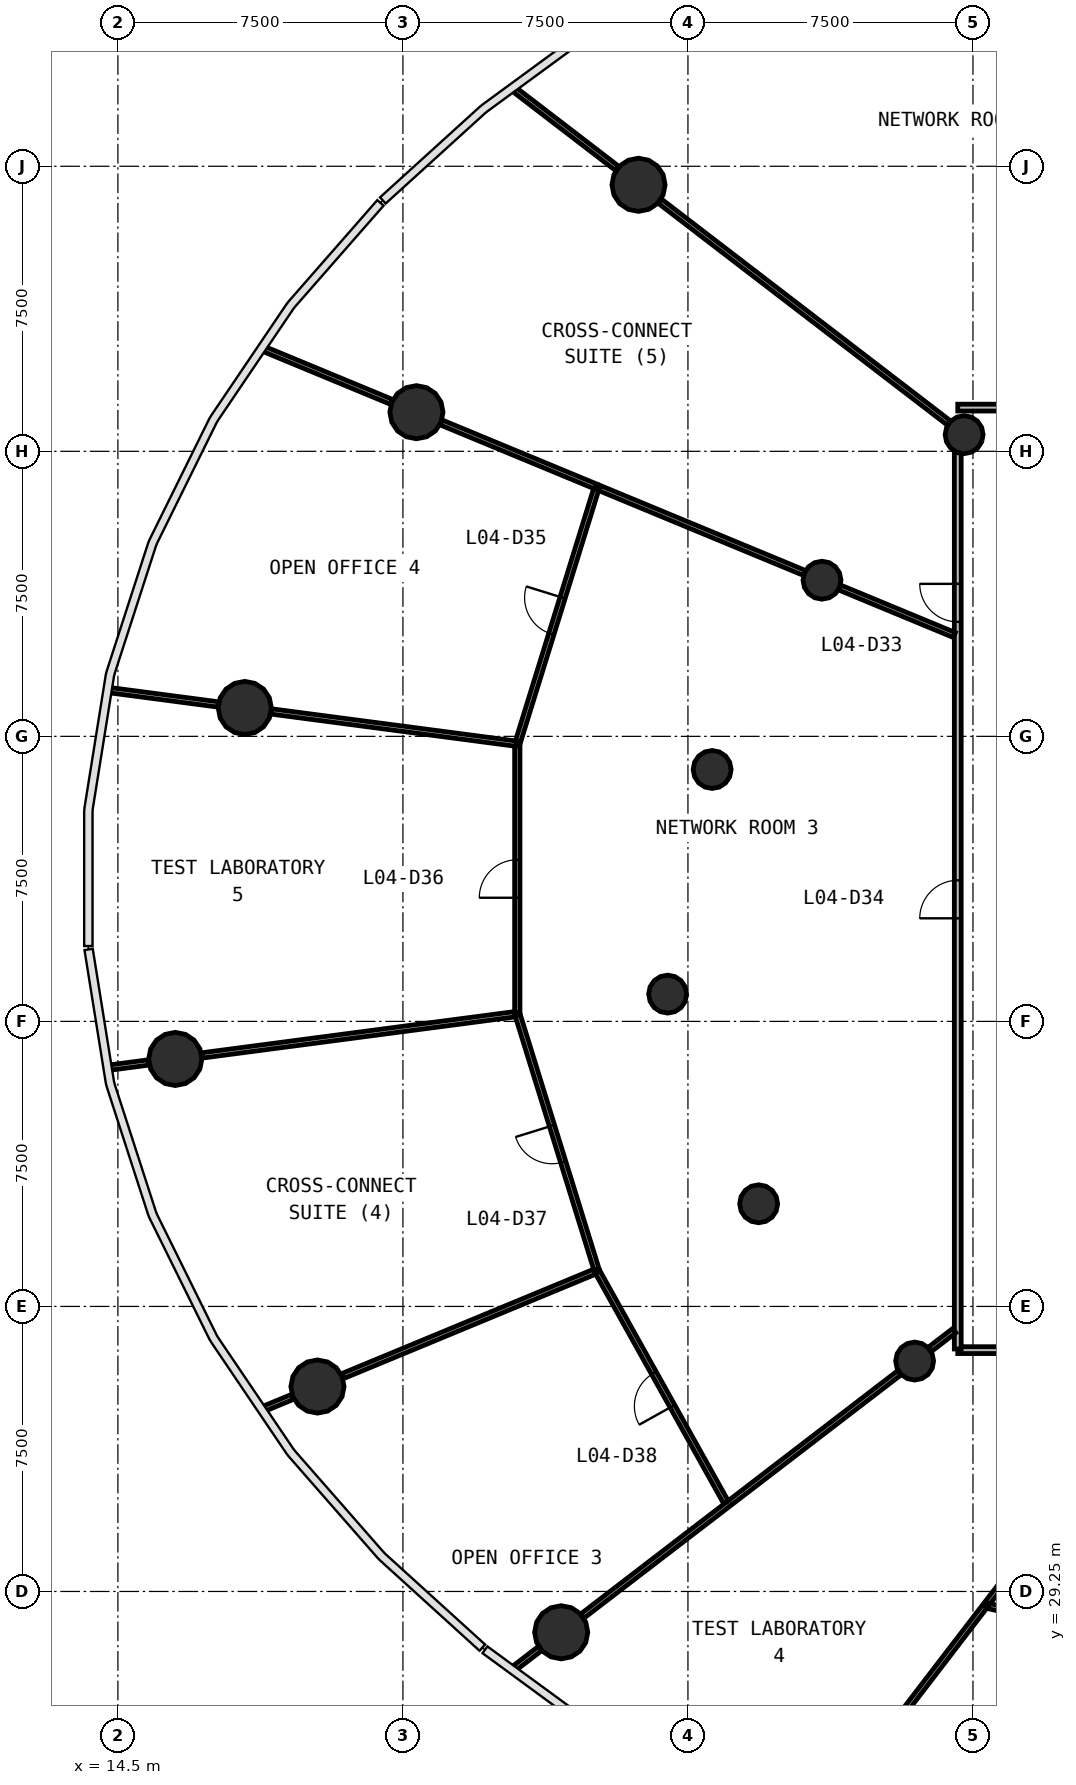
"""IFC4 building model, lengths in metres.
Left out: names, types, materials, properties, quantities, classifications, styles, units other than length and angle.
Written with IfcOpenShell. Run it as: python <this file> out.ifc"""

import sys

from ifc_helpers import new_model, si_unit, direction, frame, frame_2d, origin, origin_2d, place, context, subcontext, project, spatial, rectangle, circle, extrude, source, transform, mapped, element, fill, save


model = new_model("IFC4")
c1 = context("Model", 3, precision=1e-05, world=origin(), true_north=direction((0.0, 1.0)))
c2 = subcontext(c1, "Body", "Model", "MODEL_VIEW")
j1 = project(units=[si_unit("LENGTHUNIT", "METRE"), si_unit("PLANEANGLEUNIT", "RADIAN")], contexts=[c1])
p1 = place(None, origin())
s1 = spatial("IfcSite", under=j1, at=p1, CompositionType="ELEMENT")
p2 = place(p1, origin())
s2 = spatial("IfcBuilding", under=s1, at=p2, CompositionType="ELEMENT")
p3 = place(p2, frame((0.0, 0.0, 18.2)))
s3 = spatial("IfcBuildingStorey", under=s2, at=p3, CompositionType="ELEMENT", Elevation=18.2)
m1 = source(origin(), c2, "Body", "SweptSolid", [
    extrude(circle(Radius=0.7, at=origin_2d()), origin(), (0.0, 0.0, 1.0), 4.4),
])
for number, where, z_axis, x_axis in (
    (1, (28.199, 66.263, 0.0), (0.0, 0.0, 1.0), (1.0, 0.0, 0.0)),
    (2, (22.355, 60.279, 0.0), (0.0, 0.0, 1.0), (1.0, 0.0, 0.0)),
    (3, (17.839, 52.497, 0.0), (0.0, 0.0, 1.0), (1.0, 0.0, 0.0)),
    (4, (16.01, 43.262, 0.0), (0.0, 0.0, 1.0), (1.0, 0.0, 0.0)),
    (5, (19.751, 34.642, 0.0), (0.0, 0.0, 1.0), (1.0, 0.0, 0.0)),
    (6, (26.164, 28.176, 0.0), (0.0, 0.0, 1.0), (1.0, 0.0, 0.0)),
):
    element("IfcColumn", number, at=place(p3, frame(where, z_axis=z_axis, x_axis=x_axis)), inside=s3, PredefinedType="COLUMN", context=c2, shape_type="MappedRepresentation", body=[
        mapped(m1, transform((0.0, 0.0, 0.0), scale=1.0)),
    ])
m2 = source(origin(), c2, "Body", "SweptSolid", [
    extrude(circle(Radius=0.5, at=origin_2d()), origin(), (0.0, 0.0, 1.0), 4.4),
])
for number, where, z_axis, x_axis in (
    (7, (36.768, 59.688, 0.0), (0.0, 0.0, 1.0), (1.0, 0.0, 0.0)),
    (8, (33.028, 55.859, 0.0), (0.0, 0.0, 1.0), (1.0, 0.0, 0.0)),
    (9, (30.137, 50.878, 0.0), (0.0, 0.0, 1.0), (1.0, 0.0, 0.0)),
    (10, (28.966, 44.968, 0.0), (0.0, 0.0, 1.0), (1.0, 0.0, 0.0)),
    (11, (31.361, 39.451, 0.0), (0.0, 0.0, 1.0), (1.0, 0.0, 0.0)),
    (12, (35.465, 35.312, 0.0), (0.0, 0.0, 1.0), (1.0, 0.0, 0.0)),
):
    element("IfcColumn", number, at=place(p3, frame(where, z_axis=z_axis, x_axis=x_axis)), inside=s3, PredefinedType="COLUMN", context=c2, shape_type="MappedRepresentation", body=[
        mapped(m2, transform((0.0, 0.0, 0.0), scale=1.0)),
    ])
p4 = place(p3, frame((67.4, 35.6, 0.0), z_axis=(0.0, 0.0, 1.0), x_axis=(-1.0, 0.0, 0.0)))
e13 = element("IfcWall", 13, at=p4, inside=s3, PredefinedType="PARTITIONING", context=c2, shape_type="SweptSolid", body=[
    extrude(rectangle(XDim=30.8, YDim=0.18, at=frame_2d((15.4, 0.0))), origin(), (0.0, 0.0, 1.0), 3.15),
])
p5 = place(p4, frame((25.55, 0.0, 0.0)))
e14 = element("IfcOpeningElement", 14, at=p5, cuts=e13, PredefinedType="OPENING", context=c2, shape_type="SweptSolid", body=[
    extrude(rectangle(XDim=1.0, YDim=2.1, at=frame_2d((0.5, 1.05))), frame((0.0, 0.1, 0.0), z_axis=(0.0, -1.0, 0.0), x_axis=(1.0, 0.0, 0.0)), (0.0, 0.0, 1.0), 0.2),
])
p6 = place(p4, frame((14.95, 0.0, 0.0)))
e15 = element("IfcOpeningElement", 15, at=p6, cuts=e13, PredefinedType="OPENING", context=c2, shape_type="SweptSolid", body=[
    extrude(rectangle(XDim=1.0, YDim=2.1, at=frame_2d((0.5, 1.05))), frame((0.0, 0.1, 0.0), z_axis=(0.0, -1.0, 0.0), x_axis=(1.0, 0.0, 0.0)), (0.0, 0.0, 1.0), 0.2),
])
p7 = place(p4, frame((8.95, 0.0, 0.0)))
e16 = element("IfcOpeningElement", 16, at=p7, cuts=e13, PredefinedType="OPENING", context=c2, shape_type="SweptSolid", body=[
    extrude(rectangle(XDim=1.0, YDim=2.1, at=frame_2d((0.5, 1.05))), frame((0.0, 0.1, 0.0), z_axis=(0.0, -1.0, 0.0), x_axis=(1.0, 0.0, 0.0)), (0.0, 0.0, 1.0), 0.2),
])
p8 = place(p3, frame((36.6, 60.4, 0.0), z_axis=(0.0, 0.0, 1.0), x_axis=(1.0, 0.0, 0.0)))
e17 = element("IfcWall", 17, at=p8, inside=s3, PredefinedType="PARTITIONING", context=c2, shape_type="SweptSolid", body=[
    extrude(rectangle(XDim=30.8, YDim=0.18, at=frame_2d((15.4, 0.0))), origin(), (0.0, 0.0, 1.0), 3.15),
])
p9 = place(p8, frame((17.35, 0.0, 0.0)))
e18 = element("IfcOpeningElement", 18, at=p9, cuts=e17, PredefinedType="OPENING", context=c2, shape_type="SweptSolid", body=[
    extrude(rectangle(XDim=1.0, YDim=2.1, at=frame_2d((0.5, 1.05))), frame((0.0, 0.1, 0.0), z_axis=(0.0, -1.0, 0.0), x_axis=(1.0, 0.0, 0.0)), (0.0, 0.0, 1.0), 0.2),
])
p10 = place(p8, frame((14.85, 0.0, 0.0)))
e19 = element("IfcOpeningElement", 19, at=p10, cuts=e17, PredefinedType="OPENING", context=c2, shape_type="SweptSolid", body=[
    extrude(rectangle(XDim=0.9, YDim=2.1, at=frame_2d((0.45, 1.05))), frame((0.0, 0.1, 0.0), z_axis=(0.0, -1.0, 0.0), x_axis=(1.0, 0.0, 0.0)), (0.0, 0.0, 1.0), 0.2),
])
p11 = place(p8, frame((12.65, 0.0, 0.0)))
e20 = element("IfcOpeningElement", 20, at=p11, cuts=e17, PredefinedType="OPENING", context=c2, shape_type="SweptSolid", body=[
    extrude(rectangle(XDim=0.9, YDim=2.1, at=frame_2d((0.45, 1.05))), frame((0.0, 0.1, 0.0), z_axis=(0.0, -1.0, 0.0), x_axis=(1.0, 0.0, 0.0)), (0.0, 0.0, 1.0), 0.2),
])
p12 = place(p8, frame((8.95, 0.0, 0.0)))
e21 = element("IfcOpeningElement", 21, at=p12, cuts=e17, PredefinedType="OPENING", context=c2, shape_type="SweptSolid", body=[
    extrude(rectangle(XDim=1.0, YDim=2.1, at=frame_2d((0.5, 1.05))), frame((0.0, 0.1, 0.0), z_axis=(0.0, -1.0, 0.0), x_axis=(1.0, 0.0, 0.0)), (0.0, 0.0, 1.0), 0.2),
])
p13 = place(p3, frame((36.6, 35.63, 0.0), z_axis=(0.0, 0.0, 1.0), x_axis=(0.0, 1.0, 0.0)))
e22 = element("IfcWall", 22, at=p13, inside=s3, PredefinedType="PARTITIONING", context=c2, shape_type="SweptSolid", body=[
    extrude(rectangle(XDim=23.583, YDim=0.18, at=frame_2d((11.791, 0.0))), origin(), (0.0, 0.0, 1.0), 3.15),
])
p14 = place(p13, frame((19.133, 0.0, 0.0)))
e23 = element("IfcOpeningElement", 23, at=p14, cuts=e22, PredefinedType="OPENING", context=c2, shape_type="SweptSolid", body=[
    extrude(rectangle(XDim=1.0, YDim=2.1, at=frame_2d((0.5, 1.05))), frame((0.0, 0.1, 0.0), z_axis=(0.0, -1.0, 0.0), x_axis=(1.0, 0.0, 0.0)), (0.0, 0.0, 1.0), 0.2),
])
p15 = place(p13, frame((11.333, 0.0, 0.0)))
e24 = element("IfcOpeningElement", 24, at=p15, cuts=e22, PredefinedType="OPENING", context=c2, shape_type="SweptSolid", body=[
    extrude(rectangle(XDim=1.0, YDim=2.1, at=frame_2d((0.5, 1.05))), frame((0.0, 0.1, 0.0), z_axis=(0.0, -1.0, 0.0), x_axis=(1.0, 0.0, 0.0)), (0.0, 0.0, 1.0), 0.2),
])
p16 = place(p3, frame((26.723, 28.604, 0.0), z_axis=(0.0, 0.0, 1.0), x_axis=(0.793353660174, 0.608761012129, 0.0)))
e25 = element("IfcWall", 25, at=p16, inside=s3, PredefinedType="PARTITIONING", context=c2, shape_type="SweptSolid", body=[
    extrude(rectangle(XDim=10.515, YDim=0.14, at=frame_2d((5.257, 0.0))), origin(), (0.0, 0.0, 1.0), 3.15),
])
p17 = place(p3, frame((36.367, 59.995, 0.0), z_axis=(0.0, 0.0, 1.0), x_axis=(-0.793366218398, 0.608744645566, 0.0)))
e26 = element("IfcWall", 26, at=p17, inside=s3, PredefinedType="PARTITIONING", context=c2, shape_type="SweptSolid", body=[
    extrude(rectangle(XDim=9.591, YDim=0.14, at=frame_2d((4.796, 0.0))), origin(), (0.0, 0.0, 1.0), 3.15),
])
p18 = place(p3, frame((25.01, 44.447, 0.0), z_axis=(0.0, 0.0, 1.0), x_axis=(-0.991444269677, -0.130530686527, 0.0)))
e27 = element("IfcWall", 27, at=p18, inside=s3, PredefinedType="PARTITIONING", context=c2, shape_type="SweptSolid", body=[
    extrude(rectangle(XDim=8.374, YDim=0.14, at=frame_2d((4.187, 0.0))), origin(), (0.0, 0.0, 1.0), 3.15),
])
p19 = place(p3, frame((27.104, 37.688, 0.0), z_axis=(0.0, 0.0, 1.0), x_axis=(-0.923879422024, -0.382683699105, 0.0)))
e28 = element("IfcWall", 28, at=p19, inside=s3, PredefinedType="PARTITIONING", context=c2, shape_type="SweptSolid", body=[
    extrude(rectangle(XDim=7.254, YDim=0.14, at=frame_2d((3.627, 0.0))), origin(), (0.0, 0.0, 1.0), 3.15),
])
p20 = place(p3, frame((25.01, 44.477, 0.0), z_axis=(0.0, 0.0, 1.0), x_axis=(0.0, 1.0, 0.0)))
e29 = element("IfcWall", 29, at=p20, inside=s3, PredefinedType="PARTITIONING", context=c2, shape_type="SweptSolid", body=[
    extrude(rectangle(XDim=7.077, YDim=0.14, at=frame_2d((3.538, 0.0))), origin(), (0.0, 0.0, 1.0), 3.15),
])
p21 = place(p20, frame((3.027, 0.0, 0.0)))
e30 = element("IfcOpeningElement", 30, at=p21, cuts=e29, PredefinedType="OPENING", context=c2, shape_type="SweptSolid", body=[
    extrude(rectangle(XDim=1.0, YDim=2.1, at=frame_2d((0.5, 1.05))), frame((0.0, 0.08, 0.0), z_axis=(0.0, -1.0, 0.0), x_axis=(1.0, 0.0, 0.0)), (0.0, 0.0, 1.0), 0.16),
])
p22 = place(p3, frame((25.019, 51.582, 0.0), z_axis=(0.0, 0.0, 1.0), x_axis=(0.296052616662, 0.955171632832, 0.0)))
e31 = element("IfcWall", 31, at=p22, inside=s3, PredefinedType="PARTITIONING", context=c2, shape_type="SweptSolid", body=[
    extrude(rectangle(XDim=7.046, YDim=0.14, at=frame_2d((3.523, 0.0))), origin(), (0.0, 0.0, 1.0), 3.15),
])
p23 = place(p22, frame((2.996, 0.0, 0.0)))
e32 = element("IfcOpeningElement", 32, at=p23, cuts=e31, PredefinedType="OPENING", context=c2, shape_type="SweptSolid", body=[
    extrude(rectangle(XDim=1.0, YDim=2.1, at=frame_2d((0.5, 1.05))), frame((0.0, 0.08, 0.0), z_axis=(0.0, -1.0, 0.0), x_axis=(1.0, 0.0, 0.0)), (0.0, 0.0, 1.0), 0.16),
])
p24 = place(p3, frame((27.095, 37.717, 0.0), z_axis=(0.0, 0.0, 1.0), x_axis=(-0.296029243549, 0.955178876946, 0.0)))
e33 = element("IfcWall", 33, at=p24, inside=s3, PredefinedType="PARTITIONING", context=c2, shape_type="SweptSolid", body=[
    extrude(rectangle(XDim=7.016, YDim=0.14, at=frame_2d((3.508, 0.0))), origin(), (0.0, 0.0, 1.0), 3.15),
])
p25 = place(p24, frame((2.966, 0.0, 0.0)))
e34 = element("IfcOpeningElement", 34, at=p25, cuts=e33, PredefinedType="OPENING", context=c2, shape_type="SweptSolid", body=[
    extrude(rectangle(XDim=1.0, YDim=2.1, at=frame_2d((0.5, 1.05))), frame((0.0, 0.08, 0.0), z_axis=(0.0, -1.0, 0.0), x_axis=(1.0, 0.0, 0.0)), (0.0, 0.0, 1.0), 0.16),
])
p26 = place(p3, frame((30.502, 31.593, 0.0), z_axis=(0.0, 0.0, 1.0), x_axis=(-0.486916265404, 0.873448653606, 0.0)))
e35 = element("IfcWall", 35, at=p26, inside=s3, PredefinedType="PARTITIONING", context=c2, shape_type="SweptSolid", body=[
    extrude(rectangle(XDim=6.948, YDim=0.14, at=frame_2d((3.474, 0.0))), origin(), (0.0, 0.0, 1.0), 3.15),
])
p27 = place(p26, frame((2.899, 0.0, 0.0)))
e36 = element("IfcOpeningElement", 36, at=p27, cuts=e35, PredefinedType="OPENING", context=c2, shape_type="SweptSolid", body=[
    extrude(rectangle(XDim=1.0, YDim=2.1, at=frame_2d((0.5, 1.05))), frame((0.0, 0.08, 0.0), z_axis=(0.0, -1.0, 0.0), x_axis=(1.0, 0.0, 0.0)), (0.0, 0.0, 1.0), 0.16),
])
p28 = place(p3, frame((24.98, 51.557, 0.0), z_axis=(0.0, 0.0, 1.0), x_axis=(-0.9914463656, 0.130514765976, 0.0)))
e37 = element("IfcWall", 37, at=p28, inside=s3, PredefinedType="PARTITIONING", context=c2, shape_type="SweptSolid", body=[
    extrude(rectangle(XDim=6.499, YDim=0.14, at=frame_2d((3.249, 0.0))), origin(), (0.0, 0.0, 1.0), 3.15),
])
p29 = place(p3, frame((43.503, 27.486, 0.0), z_axis=(0.0, 0.0, 1.0), x_axis=(-0.975258543616, 0.221067349702, 0.0)))
e38 = element("IfcWall", 38, at=p29, inside=s3, PredefinedType="PARTITIONING", context=c2, shape_type="SweptSolid", body=[
    extrude(rectangle(XDim=6.327, YDim=0.14, at=frame_2d((3.164, 0.0))), origin(), (0.0, 0.0, 1.0), 3.15),
])
p30 = place(p29, frame((2.677, 0.0, 0.0)))
e39 = element("IfcOpeningElement", 39, at=p30, cuts=e38, PredefinedType="OPENING", context=c2, shape_type="SweptSolid", body=[
    extrude(rectangle(XDim=1.0, YDim=2.1, at=frame_2d((0.5, 1.05))), frame((0.0, 0.08, 0.0), z_axis=(0.0, -1.0, 0.0), x_axis=(1.0, 0.0, 0.0)), (0.0, 0.0, 1.0), 0.16),
])
p31 = place(p3, frame((32.561, 56.052, 0.0), z_axis=(0.0, 0.0, 1.0), x_axis=(-0.923886814097, 0.382665852588, 0.0)))
e40 = element("IfcWall", 40, at=p31, inside=s3, PredefinedType="PARTITIONING", context=c2, shape_type="SweptSolid", body=[
    extrude(rectangle(XDim=5.836, YDim=0.14, at=frame_2d((2.918, 0.0))), origin(), (0.0, 0.0, 1.0), 3.15),
])
p32 = place(p3, frame((37.314, 28.861, 0.0), z_axis=(0.0, 0.0, 1.0), x_axis=(-0.608764043611, -0.79335133403, 0.0)))
e41 = element("IfcWall", 41, at=p32, inside=s3, PredefinedType="PARTITIONING", context=c2, shape_type="SweptSolid", body=[
    extrude(rectangle(XDim=5.548, YDim=0.14, at=frame_2d((2.774, 0.0))), origin(), (0.0, 0.0, 1.0), 3.15),
])
p33 = place(p3, frame((27.077, 58.323, 0.0), z_axis=(0.0, 0.0, 1.0), x_axis=(-0.923858763081, 0.382733570356, 0.0)))
e42 = element("IfcWall", 42, at=p33, inside=s3, PredefinedType="PARTITIONING", context=c2, shape_type="SweptSolid", body=[
    extrude(rectangle(XDim=4.405, YDim=0.14, at=frame_2d((2.203, 0.0))), origin(), (0.0, 0.0, 1.0), 3.15),
])
p34 = place(p3, frame((39.858, 32.176, 0.0), z_axis=(0.0, 0.0, 1.0), x_axis=(-0.608780171248, -0.793338958513, 0.0)))
e43 = element("IfcWall", 43, at=p34, inside=s3, PredefinedType="PARTITIONING", context=c2, shape_type="SweptSolid", body=[
    extrude(rectangle(XDim=4.072, YDim=0.14, at=frame_2d((2.036, 0.0))), origin(), (0.0, 0.0, 1.0), 3.15),
])
p35 = place(p3, frame((21.704, 60.549, 0.0), z_axis=(0.0, 0.0, 1.0), x_axis=(-0.923882033439, 0.382677394537, 0.0)))
e44 = element("IfcWall", 44, at=p35, inside=s3, PredefinedType="PARTITIONING", context=c2, shape_type="SweptSolid", body=[
    extrude(rectangle(XDim=3.642, YDim=0.14, at=frame_2d((1.821, 0.0))), origin(), (0.0, 0.0, 1.0), 3.15),
])
p36 = place(p3, frame((27.641, 66.691, 0.0), z_axis=(0.0, 0.0, 1.0), x_axis=(-0.793324630829, 0.608798842082, 0.0)))
e45 = element("IfcWall", 45, at=p36, inside=s3, PredefinedType="PARTITIONING", context=c2, shape_type="SweptSolid", body=[
    extrude(rectangle(XDim=3.404, YDim=0.14, at=frame_2d((1.702, 0.0))), origin(), (0.0, 0.0, 1.0), 3.15),
])
p37 = place(p3, frame((36.51, 54.416, 0.0), z_axis=(0.0, 0.0, 1.0), x_axis=(-0.923911109142, 0.382607190737, 0.0)))
e46 = element("IfcWall", 46, at=p37, inside=s3, PredefinedType="PARTITIONING", context=c2, shape_type="SweptSolid", body=[
    extrude(rectangle(XDim=3.264, YDim=0.14, at=frame_2d((1.632, 0.0))), origin(), (0.0, 0.0, 1.0), 3.15),
])
p38 = place(p3, frame((17.141, 52.589, 0.0), z_axis=(0.0, 0.0, 1.0), x_axis=(-0.991443227873, 0.130538599287, 0.0)))
e47 = element("IfcWall", 47, at=p38, inside=s3, PredefinedType="PARTITIONING", context=c2, shape_type="SweptSolid", body=[
    extrude(rectangle(XDim=2.854, YDim=0.14, at=frame_2d((1.427, 0.0))), origin(), (0.0, 0.0, 1.0), 3.15),
])
p39 = place(p3, frame((15.311, 43.17, 0.0), z_axis=(0.0, 0.0, 1.0), x_axis=(-0.991425443612, -0.130673600086, 0.0)))
e48 = element("IfcWall", 48, at=p39, inside=s3, PredefinedType="PARTITIONING", context=c2, shape_type="SweptSolid", body=[
    extrude(rectangle(XDim=1.009, YDim=0.14, at=frame_2d((0.504, 0.0))), origin(), (0.0, 0.0, 1.0), 3.15),
])
p40 = place(p3, frame((36.51, 36.114, 0.0), z_axis=(0.0, 0.0, 1.0), x_axis=(-0.793316076519, -0.608809989025, 0.0)))
e49 = element("IfcWall", 49, at=p40, inside=s3, PredefinedType="PARTITIONING", context=c2, shape_type="SweptSolid", body=[
    extrude(rectangle(XDim=0.812, YDim=0.14, at=frame_2d((0.406, 0.0))), origin(), (0.0, 0.0, 1.0), 3.15),
])
p41 = place(p3, frame((24.94, 27.236, 0.0), z_axis=(0.0, 0.0, 1.0), x_axis=(0.793423692124, 0.608669733745, 0.0)))
e50 = element("IfcWall", 50, at=p41, inside=s3, PredefinedType="PARTITIONING", context=c2, shape_type="SweptSolid", body=[
    extrude(rectangle(XDim=0.839, YDim=0.14, at=frame_2d((0.419, 0.0))), origin(), (0.0, 0.0, 1.0), 3.15),
])
p42 = place(p3, frame((19.1, 34.372, 0.0), z_axis=(0.0, 0.0, 1.0), x_axis=(-0.923846977396, -0.382762017913, 0.0)))
e51 = element("IfcWall", 51, at=p42, inside=s3, PredefinedType="PARTITIONING", context=c2, shape_type="SweptSolid", body=[
    extrude(rectangle(XDim=0.823, YDim=0.14, at=frame_2d((0.412, 0.0))), origin(), (0.0, 0.0, 1.0), 3.15),
])
m3 = source(origin(), c2, "Body", "SweptSolid", [
    extrude(rectangle(XDim=1.0, YDim=2.1, at=frame_2d((0.5, 1.05))), frame((0.0, 0.025, 0.0), z_axis=(0.0, -1.0, 0.0), x_axis=(1.0, 0.0, 0.0)), (0.0, 0.0, 1.0), 0.05),
])
p43 = place(p14, origin())
e52 = element("IfcDoor", 52, at=p43, inside=s3, OperationType="SINGLE_SWING_RIGHT", PredefinedType="DOOR", context=c2, shape_type="MappedRepresentation", body=[
    mapped(m3, transform((0.0, 0.0, 0.0), scale=1.0)),
])
fill(e23, e52)
p44 = place(p15, origin())
e53 = element("IfcDoor", 53, at=p44, inside=s3, OperationType="SINGLE_SWING_LEFT", PredefinedType="DOOR", context=c2, shape_type="MappedRepresentation", body=[
    mapped(m3, transform((0.0, 0.0, 0.0), scale=1.0)),
])
fill(e24, e53)
p45 = place(p23, origin())
e54 = element("IfcDoor", 54, at=p45, inside=s3, OperationType="SINGLE_SWING_RIGHT", PredefinedType="DOOR", context=c2, shape_type="MappedRepresentation", body=[
    mapped(m3, transform((0.0, 0.0, 0.0), scale=1.0)),
])
fill(e32, e54)
p46 = place(p21, origin())
e55 = element("IfcDoor", 55, at=p46, inside=s3, OperationType="SINGLE_SWING_LEFT", PredefinedType="DOOR", context=c2, shape_type="MappedRepresentation", body=[
    mapped(m3, transform((0.0, 0.0, 0.0), scale=1.0)),
])
fill(e30, e55)
p47 = place(p25, origin())
e56 = element("IfcDoor", 56, at=p47, inside=s3, OperationType="SINGLE_SWING_RIGHT", PredefinedType="DOOR", context=c2, shape_type="MappedRepresentation", body=[
    mapped(m3, transform((0.0, 0.0, 0.0), scale=1.0)),
])
fill(e34, e56)
p48 = place(p27, origin())
e57 = element("IfcDoor", 57, at=p48, inside=s3, OperationType="SINGLE_SWING_LEFT", PredefinedType="DOOR", context=c2, shape_type="MappedRepresentation", body=[
    mapped(m3, transform((0.0, 0.0, 0.0), scale=1.0)),
])
fill(e36, e57)
save(model, sys.argv[1])
